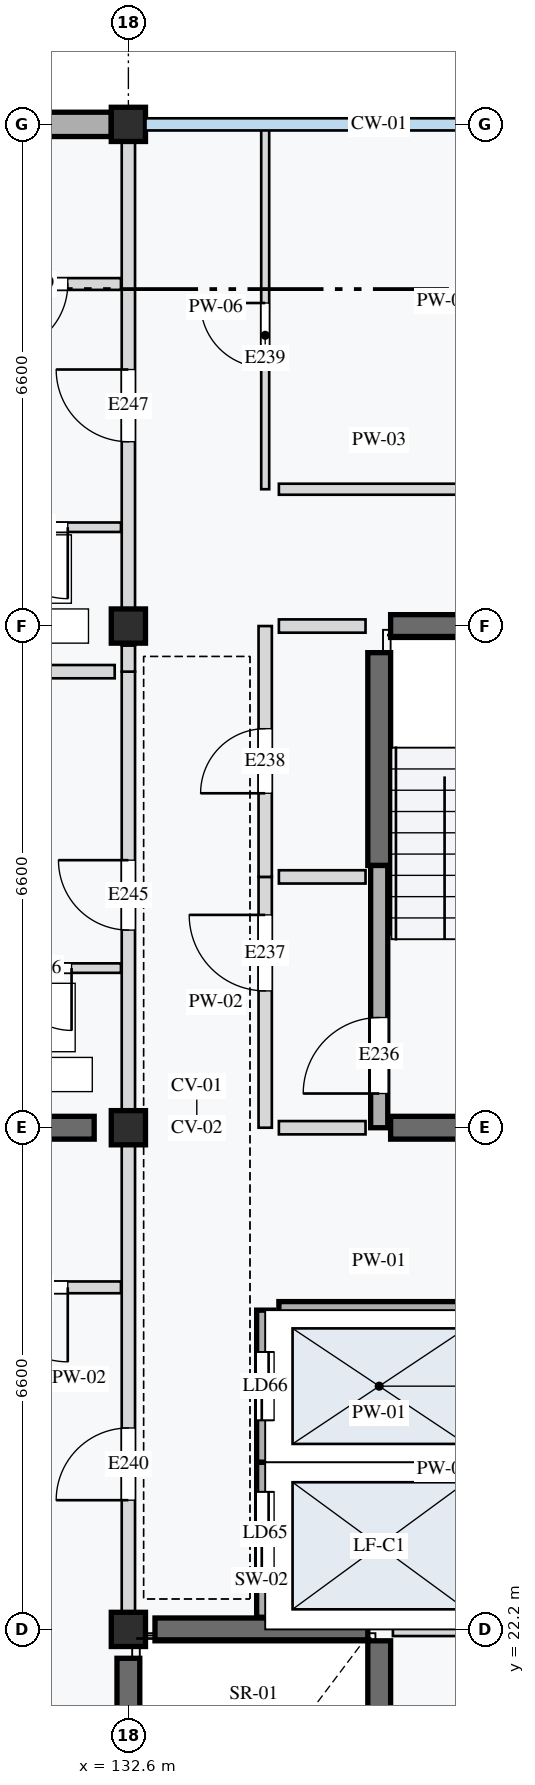
"""IFC4 building model, lengths in metres.
Left out: names, types, materials, properties, quantities, classifications, styles, units other than length and angle.
Written with IfcOpenShell. Run it as: python <this file> out.ifc"""

import sys

from ifc_helpers import new_model, si_unit, direction, frame, frame_2d, origin, origin_2d, place, context, subcontext, project, spatial, rectangle, extrude, element, fill, save


model = new_model("IFC4")
c1 = context("Model", 3, precision=1e-05, world=origin(), true_north=direction((0.0, 1.0)))
c2 = subcontext(c1, "Body", "Model", "MODEL_VIEW")
j1 = project(units=[si_unit("LENGTHUNIT", "METRE"), si_unit("PLANEANGLEUNIT", "RADIAN")], contexts=[c1])
p1 = place(None, origin())
s1 = spatial("IfcSite", under=j1, at=p1, CompositionType="ELEMENT")
p2 = place(p1, origin())
s2 = spatial("IfcBuilding", under=s1, at=p2, CompositionType="ELEMENT")
p3 = place(p2, frame((0.0, 0.0, 18.0)))
s3 = spatial("IfcBuildingStorey", under=s2, at=p3, CompositionType="ELEMENT", Elevation=18.0)
for number, where, z_axis, x_axis in (
    (1, (132.6, 22.2, 0.0), (0.0, 0.0, 1.0), (1.0, 0.0, 0.0)),
    (2, (132.6, 28.8, 0.0), (0.0, 0.0, 1.0), (1.0, 0.0, 0.0)),
    (3, (132.6, 35.4, 0.0), (0.0, 0.0, 1.0), (1.0, 0.0, 0.0)),
    (4, (132.6, 42.0, 0.0), (0.0, 0.0, 1.0), (1.0, 0.0, 0.0)),
):
    element("IfcColumn", number, at=place(p3, frame(where, z_axis=z_axis, x_axis=x_axis)), inside=s3, PredefinedType="COLUMN", context=c2, shape_type="SweptSolid", body=[
        extrude(rectangle(XDim=0.45, YDim=0.45, at=origin_2d()), origin(), (0.0, 0.0, 1.0), 3.2),
    ])
p4 = place(p3, frame((132.6, 15.98, 0.0), z_axis=(0.0, 0.0, 1.0), x_axis=(0.0, 1.0, 0.0)))
e5 = element("IfcWall", 5, at=p4, inside=s3, PredefinedType="SHEAR", context=c2, shape_type="SweptSolid", body=[
    extrude(rectangle(XDim=5.84, YDim=0.3, at=frame_2d((2.92, 0.0))), origin(), (0.0, 0.0, 1.0), 2.96),
])
p5 = place(p3, frame((135.9, 19.35, 0.0), z_axis=(0.0, 0.0, 1.0), x_axis=(0.0, 1.0, 0.0)))
e6 = element("IfcWall", 6, at=p5, inside=s3, PredefinedType="SHEAR", context=c2, shape_type="SweptSolid", body=[
    extrude(rectangle(XDim=2.7, YDim=0.3, at=frame_2d((1.35, 0.0))), origin(), (0.0, 0.0, 1.0), 2.96),
])
for number, where, z_axis, x_axis in (
    (7, (132.95, 22.2, 0.0), (0.0, 0.0, 1.0), (1.0, 0.0, 0.0)),
    (8, (135.9, 32.25, 0.0), (0.0, 0.0, 1.0), (0.0, 1.0, 0.0)),
    (9, (136.05, 28.8, 0.0), (0.0, 0.0, 1.0), (1.0, 0.0, 0.0)),
    (10, (136.05, 35.4, 0.0), (0.0, 0.0, 1.0), (1.0, 0.0, 0.0)),
):
    element("IfcWall", number, at=place(p3, frame(where, z_axis=z_axis, x_axis=x_axis)), inside=s3, PredefinedType="SHEAR", context=c2, shape_type="SweptSolid", body=[
        extrude(rectangle(XDim=2.8, YDim=0.3, at=frame_2d((1.4, 0.0))), origin(), (0.0, 0.0, 1.0), 2.96),
    ])
p6 = place(p3, frame((126.45, 28.8, 0.0), z_axis=(0.0, 0.0, 1.0), x_axis=(1.0, 0.0, 0.0)))
e11 = element("IfcWall", 11, at=p6, inside=s3, PredefinedType="SHEAR", context=c2, shape_type="SweptSolid", body=[
    extrude(rectangle(XDim=5.7, YDim=0.3, at=frame_2d((2.85, 0.0))), origin(), (0.0, 0.0, 1.0), 2.96),
])
p7 = place(p3, frame((126.225, 42.0, 0.0), z_axis=(0.0, 0.0, 1.0), x_axis=(1.0, 0.0, 0.0)))
e12 = element("IfcWall", 12, at=p7, inside=s3, PredefinedType="STANDARD", context=c2, shape_type="SweptSolid", body=[
    extrude(rectangle(XDim=6.15, YDim=0.32, at=frame_2d((3.075, 0.0))), origin(), (0.0, 0.0, 1.0), 2.65),
])
p8 = place(p3, frame((136.08, 22.2, 0.0), z_axis=(0.0, 0.0, 1.0), x_axis=(1.0, 0.0, 0.0)))
e13 = element("IfcWall", 13, at=p8, inside=s3, PredefinedType="PARTITIONING", context=c2, shape_type="SweptSolid", body=[
    extrude(rectangle(XDim=1.19, YDim=0.175, at=frame_2d((0.595, 0.0))), origin(), (0.0, 0.0, 1.0), 2.96),
])
p9 = place(p3, frame((134.4, 22.36, 0.0), z_axis=(0.0, 0.0, 1.0), x_axis=(0.0, 1.0, 0.0)))
e14 = element("IfcWall", 14, at=p9, inside=s3, PredefinedType="STANDARD", context=c2, shape_type="SweptSolid", body=[
    extrude(rectangle(XDim=2.04, YDim=0.225, at=frame_2d((1.02, 0.0))), origin(), (0.0, 0.0, 1.0), 2.96),
])
p10 = place(p9, frame((0.55, 0.0, 0.0)))
e15 = element("IfcOpeningElement", 15, at=p10, cuts=e14, PredefinedType="OPENING", context=c2, shape_type="SweptSolid", body=[
    extrude(rectangle(XDim=1.1, YDim=2.1, at=frame_2d((0.55, 1.05))), frame((0.0, 0.123, 0.0), z_axis=(0.0, -1.0, 0.0), x_axis=(1.0, 0.0, 0.0)), (0.0, 0.0, 1.0), 0.245),
])
p11 = place(p3, frame((134.4, 24.4, 0.0), z_axis=(0.0, 0.0, 1.0), x_axis=(0.0, 1.0, 0.0)))
e16 = element("IfcWall", 16, at=p11, inside=s3, PredefinedType="STANDARD", context=c2, shape_type="SweptSolid", body=[
    extrude(rectangle(XDim=2.0, YDim=0.225, at=frame_2d((1.0, 0.0))), origin(), (0.0, 0.0, 1.0), 2.96),
])
p12 = place(p11, frame((0.55, 0.0, 0.0)))
e17 = element("IfcOpeningElement", 17, at=p12, cuts=e16, PredefinedType="OPENING", context=c2, shape_type="SweptSolid", body=[
    extrude(rectangle(XDim=0.9, YDim=2.1, at=frame_2d((0.45, 1.05))), frame((0.0, 0.123, 0.0), z_axis=(0.0, -1.0, 0.0), x_axis=(1.0, 0.0, 0.0)), (0.0, 0.0, 1.0), 0.245),
])
for number, where, z_axis, x_axis in (
    (18, (134.58, 24.4, 0.0), (0.0, 0.0, 1.0), (1.0, 0.0, 0.0)),
    (19, (134.58, 26.4, 0.0), (0.0, 0.0, 1.0), (1.0, 0.0, 0.0)),
):
    element("IfcWall", number, at=place(p3, frame(where, z_axis=z_axis, x_axis=x_axis)), inside=s3, PredefinedType="STANDARD", context=c2, shape_type="SweptSolid", body=[
        extrude(rectangle(XDim=2.64, YDim=0.225, at=frame_2d((1.32, 0.0))), origin(), (0.0, 0.0, 1.0), 2.96),
    ])
p13 = place(p3, frame((135.9, 28.8, 0.0), z_axis=(0.0, 0.0, 1.0), x_axis=(0.0, 1.0, 0.0)))
e20 = element("IfcWall", 20, at=p13, inside=s3, PredefinedType="STANDARD", context=c2, shape_type="SweptSolid", body=[
    extrude(rectangle(XDim=3.45, YDim=0.225, at=frame_2d((1.725, 0.0))), origin(), (0.0, 0.0, 1.0), 2.96),
])
p14 = place(p13, frame((0.45, 0.0, 0.0)))
e21 = element("IfcOpeningElement", 21, at=p14, cuts=e20, PredefinedType="OPENING", context=c2, shape_type="SweptSolid", body=[
    extrude(rectangle(XDim=1.0, YDim=2.1, at=frame_2d((0.5, 1.05))), frame((0.0, 0.123, 0.0), z_axis=(0.0, -1.0, 0.0), x_axis=(1.0, 0.0, 0.0)), (0.0, 0.0, 1.0), 0.245),
])
p15 = place(p3, frame((134.4, 28.8, 0.0), z_axis=(0.0, 0.0, 1.0), x_axis=(0.0, 1.0, 0.0)))
e22 = element("IfcWall", 22, at=p15, inside=s3, PredefinedType="PARTITIONING", context=c2, shape_type="SweptSolid", body=[
    extrude(rectangle(XDim=3.3, YDim=0.175, at=frame_2d((1.65, 0.0))), origin(), (0.0, 0.0, 1.0), 2.96),
])
p16 = place(p15, frame((1.8, 0.0, 0.0)))
e23 = element("IfcOpeningElement", 23, at=p16, cuts=e22, PredefinedType="OPENING", context=c2, shape_type="SweptSolid", body=[
    extrude(rectangle(XDim=1.0, YDim=2.16, at=frame_2d((0.5, 1.08))), frame((0.0, 0.097, 0.0), z_axis=(0.0, -1.0, 0.0), x_axis=(1.0, 0.0, 0.0)), (0.0, 0.0, 1.0), 0.195),
])
p17 = place(p3, frame((134.4, 32.1, 0.0), z_axis=(0.0, 0.0, 1.0), x_axis=(0.0, 1.0, 0.0)))
e24 = element("IfcWall", 24, at=p17, inside=s3, PredefinedType="PARTITIONING", context=c2, shape_type="SweptSolid", body=[
    extrude(rectangle(XDim=3.3, YDim=0.175, at=frame_2d((1.65, 0.0))), origin(), (0.0, 0.0, 1.0), 2.96),
])
p18 = place(p17, frame((1.1, 0.0, 0.0)))
e25 = element("IfcOpeningElement", 25, at=p18, cuts=e24, PredefinedType="OPENING", context=c2, shape_type="SweptSolid", body=[
    extrude(rectangle(XDim=0.85, YDim=2.0, at=frame_2d((0.425, 1.0))), frame((0.0, 0.097, 0.0), z_axis=(0.0, -1.0, 0.0), x_axis=(1.0, 0.0, 0.0)), (0.0, 0.0, 1.0), 0.195),
])
for number, where, z_axis, x_axis in (
    (26, (134.58, 28.8, 0.0), (0.0, 0.0, 1.0), (1.0, 0.0, 0.0)),
    (27, (134.58, 32.1, 0.0), (0.0, 0.0, 1.0), (1.0, 0.0, 0.0)),
    (28, (134.58, 35.4, 0.0), (0.0, 0.0, 1.0), (1.0, 0.0, 0.0)),
):
    element("IfcWall", number, at=place(p3, frame(where, z_axis=z_axis, x_axis=x_axis)), inside=s3, PredefinedType="PARTITIONING", context=c2, shape_type="SweptSolid", body=[
        extrude(rectangle(XDim=1.14, YDim=0.175, at=frame_2d((0.57, 0.0))), origin(), (0.0, 0.0, 1.0), 2.96),
    ])
p19 = place(p3, frame((134.4, 37.2, 0.0), z_axis=(0.0, 0.0, 1.0), x_axis=(0.0, 1.0, 0.0)))
e29 = element("IfcWall", 29, at=p19, inside=s3, PredefinedType="PARTITIONING", context=c2, shape_type="SweptSolid", body=[
    extrude(rectangle(XDim=4.8, YDim=0.105, at=frame_2d((2.4, 0.0))), origin(), (0.0, 0.0, 1.0), 2.96),
])
p20 = place(p19, frame((1.6, 0.0, 0.0)))
e30 = element("IfcOpeningElement", 30, at=p20, cuts=e29, PredefinedType="OPENING", context=c2, shape_type="SweptSolid", body=[
    extrude(rectangle(XDim=0.85, YDim=2.1, at=frame_2d((0.425, 1.05))), frame((0.0, 0.062, 0.0), z_axis=(0.0, -1.0, 0.0), x_axis=(1.0, 0.0, 0.0)), (0.0, 0.0, 1.0), 0.125),
])
p21 = place(p3, frame((134.58, 37.2, 0.0), z_axis=(0.0, 0.0, 1.0), x_axis=(1.0, 0.0, 0.0)))
e31 = element("IfcWall", 31, at=p21, inside=s3, PredefinedType="PARTITIONING", context=c2, shape_type="SweptSolid", body=[
    extrude(rectangle(XDim=2.64, YDim=0.145, at=frame_2d((1.32, 0.0))), origin(), (0.0, 0.0, 1.0), 2.96),
])
p22 = place(p3, frame((132.6, 22.2, 0.0), z_axis=(0.0, 0.0, 1.0), x_axis=(0.0, 1.0, 0.0)))
e32 = element("IfcWall", 32, at=p22, inside=s3, PredefinedType="PARTITIONING", context=c2, shape_type="SweptSolid", body=[
    extrude(rectangle(XDim=6.6, YDim=0.175, at=frame_2d((3.3, 0.0))), origin(), (0.0, 0.0, 1.0), 2.55),
])
p23 = place(p22, frame((1.7, 0.0, 0.0)))
e33 = element("IfcOpeningElement", 33, at=p23, cuts=e32, PredefinedType="OPENING", context=c2, shape_type="SweptSolid", body=[
    extrude(rectangle(XDim=0.95, YDim=2.16, at=frame_2d((0.475, 1.08))), frame((0.0, 0.097, 0.0), z_axis=(0.0, -1.0, 0.0), x_axis=(1.0, 0.0, 0.0)), (0.0, 0.0, 1.0), 0.195),
])
p24 = place(p3, frame((132.502, 26.7, 0.0), z_axis=(0.0, 0.0, 1.0), x_axis=(-1.0, 0.0, 0.0)))
e34 = element("IfcWall", 34, at=p24, inside=s3, PredefinedType="PARTITIONING", context=c2, shape_type="SweptSolid", body=[
    extrude(rectangle(XDim=2.302, YDim=0.155, at=frame_2d((1.151, 0.0))), origin(), (0.0, 0.0, 1.0), 2.96),
])
p25 = place(p24, frame((0.7, 0.0, 0.0)))
e35 = element("IfcOpeningElement", 35, at=p25, cuts=e34, PredefinedType="OPENING", context=c2, shape_type="SweptSolid", body=[
    extrude(rectangle(XDim=0.98, YDim=2.12, at=frame_2d((0.49, 1.06))), frame((0.0, 0.087, 0.0), z_axis=(0.0, -1.0, 0.0), x_axis=(1.0, 0.0, 0.0)), (0.0, 0.0, 1.0), 0.175),
])
p26 = place(p3, frame((132.6, 28.8, 0.0), z_axis=(0.0, 0.0, 1.0), x_axis=(0.0, 1.0, 0.0)))
e36 = element("IfcWall", 36, at=p26, inside=s3, PredefinedType="PARTITIONING", context=c2, shape_type="SweptSolid", body=[
    extrude(rectangle(XDim=6.0, YDim=0.175, at=frame_2d((3.0, 0.0))), origin(), (0.0, 0.0, 1.0), 2.55),
])
p27 = place(p26, frame((2.6, 0.0, 0.0)))
e37 = element("IfcOpeningElement", 37, at=p27, cuts=e36, PredefinedType="OPENING", context=c2, shape_type="SweptSolid", body=[
    extrude(rectangle(XDim=0.92, YDim=2.14, at=frame_2d((0.46, 1.07))), frame((0.0, 0.097, 0.0), z_axis=(0.0, -1.0, 0.0), x_axis=(1.0, 0.0, 0.0)), (0.0, 0.0, 1.0), 0.195),
])
p28 = place(p3, frame((132.502, 30.9, 0.0), z_axis=(0.0, 0.0, 1.0), x_axis=(-1.0, 0.0, 0.0)))
e38 = element("IfcWall", 38, at=p28, inside=s3, PredefinedType="PARTITIONING", context=c2, shape_type="SweptSolid", body=[
    extrude(rectangle(XDim=2.202, YDim=0.125, at=frame_2d((1.101, 0.0))), origin(), (0.0, 0.0, 1.0), 2.96),
])
p29 = place(p28, frame((0.65, 0.0, 0.0)))
e39 = element("IfcOpeningElement", 39, at=p29, cuts=e38, PredefinedType="OPENING", context=c2, shape_type="SweptSolid", body=[
    extrude(rectangle(XDim=0.82, YDim=2.05, at=frame_2d((0.41, 1.025))), frame((0.0, 0.073, 0.0), z_axis=(0.0, -1.0, 0.0), x_axis=(1.0, 0.0, 0.0)), (0.0, 0.0, 1.0), 0.145),
])
p30 = place(p3, frame((132.42, 34.8, 0.0), z_axis=(0.0, 0.0, 1.0), x_axis=(-1.0, 0.0, 0.0)))
e40 = element("IfcWall", 40, at=p30, inside=s3, PredefinedType="PARTITIONING", context=c2, shape_type="SweptSolid", body=[
    extrude(rectangle(XDim=6.19, YDim=0.175, at=frame_2d((3.095, 0.0))), origin(), (0.0, 0.0, 1.0), 2.96),
])
p31 = place(p3, frame((132.6, 34.8, 0.0), z_axis=(0.0, 0.0, 1.0), x_axis=(0.0, 1.0, 0.0)))
e41 = element("IfcWall", 41, at=p31, inside=s3, PredefinedType="PARTITIONING", context=c2, shape_type="SweptSolid", body=[
    extrude(rectangle(XDim=0.345, YDim=0.175, at=frame_2d((0.172, 0.0))), origin(), (0.0, 0.0, 1.0), 2.96),
])
p32 = place(p3, frame((132.6, 35.145, 0.0), z_axis=(0.0, 0.0, 1.0), x_axis=(0.0, 1.0, 0.0)))
e42 = element("IfcWall", 42, at=p32, inside=s3, PredefinedType="PARTITIONING", context=c2, shape_type="SweptSolid", body=[
    extrude(rectangle(XDim=6.855, YDim=0.175, at=frame_2d((3.427, 0.0))), origin(), (0.0, 0.0, 1.0), 2.55),
])
p33 = place(p32, frame((2.68, 0.0, 0.0)))
e43 = element("IfcOpeningElement", 43, at=p33, cuts=e42, PredefinedType="OPENING", context=c2, shape_type="SweptSolid", body=[
    extrude(rectangle(XDim=0.95, YDim=2.1, at=frame_2d((0.475, 1.05))), frame((0.0, 0.097, 0.0), z_axis=(0.0, -1.0, 0.0), x_axis=(1.0, 0.0, 0.0)), (0.0, 0.0, 1.0), 0.195),
])
p34 = place(p3, frame((132.502, 36.7, 0.0), z_axis=(0.0, 0.0, 1.0), x_axis=(-1.0, 0.0, 0.0)))
e44 = element("IfcWall", 44, at=p34, inside=s3, PredefinedType="PARTITIONING", context=c2, shape_type="SweptSolid", body=[
    extrude(rectangle(XDim=2.302, YDim=0.125, at=frame_2d((1.151, 0.0))), origin(), (0.0, 0.0, 1.0), 2.96),
])
p35 = place(p34, frame((0.7, 0.0, 0.0)))
e45 = element("IfcOpeningElement", 45, at=p35, cuts=e44, PredefinedType="OPENING", context=c2, shape_type="SweptSolid", body=[
    extrude(rectangle(XDim=0.94, YDim=2.08, at=frame_2d((0.47, 1.04))), frame((0.0, 0.073, 0.0), z_axis=(0.0, -1.0, 0.0), x_axis=(1.0, 0.0, 0.0)), (0.0, 0.0, 1.0), 0.145),
])
p36 = place(p3, frame((132.502, 39.9, 0.0), z_axis=(0.0, 0.0, 1.0), x_axis=(-1.0, 0.0, 0.0)))
e46 = element("IfcWall", 46, at=p36, inside=s3, PredefinedType="PARTITIONING", context=c2, shape_type="SweptSolid", body=[
    extrude(rectangle(XDim=2.302, YDim=0.155, at=frame_2d((1.151, 0.0))), origin(), (0.0, 0.0, 1.0), 2.96),
])
p37 = place(p36, frame((0.7, 0.0, 0.0)))
e47 = element("IfcOpeningElement", 47, at=p37, cuts=e46, PredefinedType="OPENING", context=c2, shape_type="SweptSolid", body=[
    extrude(rectangle(XDim=0.9, YDim=2.1, at=frame_2d((0.45, 1.05))), frame((0.0, 0.087, 0.0), z_axis=(0.0, -1.0, 0.0), x_axis=(1.0, 0.0, 0.0)), (0.0, 0.0, 1.0), 0.175),
])
p38 = place(p10, origin())
e48 = element("IfcDoor", 48, at=p38, inside=s3, OperationType="DOUBLE_DOOR_SLIDING", PredefinedType="DOOR", context=c2, shape_type="SweptSolid", body=[
    extrude(rectangle(XDim=1.1, YDim=2.1, at=frame_2d((0.55, 1.05))), frame((0.0, 0.025, 0.0), z_axis=(0.0, -1.0, 0.0), x_axis=(1.0, 0.0, 0.0)), (0.0, 0.0, 1.0), 0.05),
])
fill(e15, e48)
p39 = place(p12, origin())
e49 = element("IfcDoor", 49, at=p39, inside=s3, OperationType="DOUBLE_DOOR_SLIDING", PredefinedType="DOOR", context=c2, shape_type="SweptSolid", body=[
    extrude(rectangle(XDim=0.9, YDim=2.1, at=frame_2d((0.45, 1.05))), frame((0.0, 0.025, 0.0), z_axis=(0.0, -1.0, 0.0), x_axis=(1.0, 0.0, 0.0)), (0.0, 0.0, 1.0), 0.05),
])
fill(e17, e49)
p40 = place(p14, origin())
e50 = element("IfcDoor", 50, at=p40, inside=s3, OperationType="SINGLE_SWING_LEFT", PredefinedType="DOOR", context=c2, shape_type="SweptSolid", body=[
    extrude(rectangle(XDim=1.0, YDim=2.1, at=frame_2d((0.5, 1.05))), frame((0.0, 0.025, 0.0), z_axis=(0.0, -1.0, 0.0), x_axis=(1.0, 0.0, 0.0)), (0.0, 0.0, 1.0), 0.05),
])
fill(e21, e50)
p41 = place(p16, origin())
e51 = element("IfcDoor", 51, at=p41, inside=s3, OperationType="SINGLE_SWING_RIGHT", PredefinedType="DOOR", context=c2, shape_type="SweptSolid", body=[
    extrude(rectangle(XDim=1.0, YDim=2.16, at=frame_2d((0.5, 1.08))), frame((0.0, 0.025, 0.0), z_axis=(0.0, -1.0, 0.0), x_axis=(1.0, 0.0, 0.0)), (0.0, 0.0, 1.0), 0.05),
])
fill(e23, e51)
p42 = place(p18, origin())
e52 = element("IfcDoor", 52, at=p42, inside=s3, OperationType="SINGLE_SWING_LEFT", PredefinedType="DOOR", context=c2, shape_type="SweptSolid", body=[
    extrude(rectangle(XDim=0.85, YDim=2.0, at=frame_2d((0.425, 1.0))), frame((0.0, 0.025, 0.0), z_axis=(0.0, -1.0, 0.0), x_axis=(1.0, 0.0, 0.0)), (0.0, 0.0, 1.0), 0.05),
])
fill(e25, e52)
p43 = place(p20, origin())
e53 = element("IfcDoor", 53, at=p43, inside=s3, OperationType="SINGLE_SWING_RIGHT", PredefinedType="DOOR", context=c2, shape_type="SweptSolid", body=[
    extrude(rectangle(XDim=0.85, YDim=2.1, at=frame_2d((0.425, 1.05))), frame((0.0, 0.025, 0.0), z_axis=(0.0, -1.0, 0.0), x_axis=(1.0, 0.0, 0.0)), (0.0, 0.0, 1.0), 0.05),
])
fill(e30, e53)
p44 = place(p23, origin())
e54 = element("IfcDoor", 54, at=p44, inside=s3, OperationType="SINGLE_SWING_LEFT", PredefinedType="DOOR", context=c2, shape_type="SweptSolid", body=[
    extrude(rectangle(XDim=0.95, YDim=2.16, at=frame_2d((0.475, 1.08))), frame((0.0, 0.025, 0.0), z_axis=(0.0, -1.0, 0.0), x_axis=(1.0, 0.0, 0.0)), (0.0, 0.0, 1.0), 0.05),
])
fill(e33, e54)
p45 = place(p25, origin())
e55 = element("IfcDoor", 55, at=p45, inside=s3, OperationType="SINGLE_SWING_LEFT", PredefinedType="DOOR", context=c2, shape_type="SweptSolid", body=[
    extrude(rectangle(XDim=0.98, YDim=2.12, at=frame_2d((0.49, 1.06))), frame((0.0, 0.025, 0.0), z_axis=(0.0, -1.0, 0.0), x_axis=(1.0, 0.0, 0.0)), (0.0, 0.0, 1.0), 0.05),
])
fill(e35, e55)
p46 = place(p27, origin())
e56 = element("IfcDoor", 56, at=p46, inside=s3, OperationType="SINGLE_SWING_RIGHT", PredefinedType="DOOR", context=c2, shape_type="SweptSolid", body=[
    extrude(rectangle(XDim=0.92, YDim=2.14, at=frame_2d((0.46, 1.07))), frame((0.0, 0.025, 0.0), z_axis=(0.0, -1.0, 0.0), x_axis=(1.0, 0.0, 0.0)), (0.0, 0.0, 1.0), 0.05),
])
fill(e37, e56)
p47 = place(p29, origin())
e57 = element("IfcDoor", 57, at=p47, inside=s3, OperationType="SINGLE_SWING_LEFT", PredefinedType="DOOR", context=c2, shape_type="SweptSolid", body=[
    extrude(rectangle(XDim=0.82, YDim=2.05, at=frame_2d((0.41, 1.025))), frame((0.0, 0.025, 0.0), z_axis=(0.0, -1.0, 0.0), x_axis=(1.0, 0.0, 0.0)), (0.0, 0.0, 1.0), 0.05),
])
fill(e39, e57)
p48 = place(p33, origin())
e58 = element("IfcDoor", 58, at=p48, inside=s3, OperationType="SINGLE_SWING_RIGHT", PredefinedType="DOOR", context=c2, shape_type="SweptSolid", body=[
    extrude(rectangle(XDim=0.95, YDim=2.1, at=frame_2d((0.475, 1.05))), frame((0.0, 0.025, 0.0), z_axis=(0.0, -1.0, 0.0), x_axis=(1.0, 0.0, 0.0)), (0.0, 0.0, 1.0), 0.05),
])
fill(e43, e58)
p49 = place(p35, origin())
e59 = element("IfcDoor", 59, at=p49, inside=s3, OperationType="SINGLE_SWING_LEFT", PredefinedType="DOOR", context=c2, shape_type="SweptSolid", body=[
    extrude(rectangle(XDim=0.94, YDim=2.08, at=frame_2d((0.47, 1.04))), frame((0.0, 0.025, 0.0), z_axis=(0.0, -1.0, 0.0), x_axis=(1.0, 0.0, 0.0)), (0.0, 0.0, 1.0), 0.05),
])
fill(e45, e59)
p50 = place(p37, origin())
e60 = element("IfcDoor", 60, at=p50, inside=s3, OperationType="SINGLE_SWING_RIGHT", PredefinedType="DOOR", context=c2, shape_type="SweptSolid", body=[
    extrude(rectangle(XDim=0.9, YDim=2.1, at=frame_2d((0.45, 1.05))), frame((0.0, 0.025, 0.0), z_axis=(0.0, -1.0, 0.0), x_axis=(1.0, 0.0, 0.0)), (0.0, 0.0, 1.0), 0.05),
])
fill(e47, e60)
save(model, sys.argv[1])
